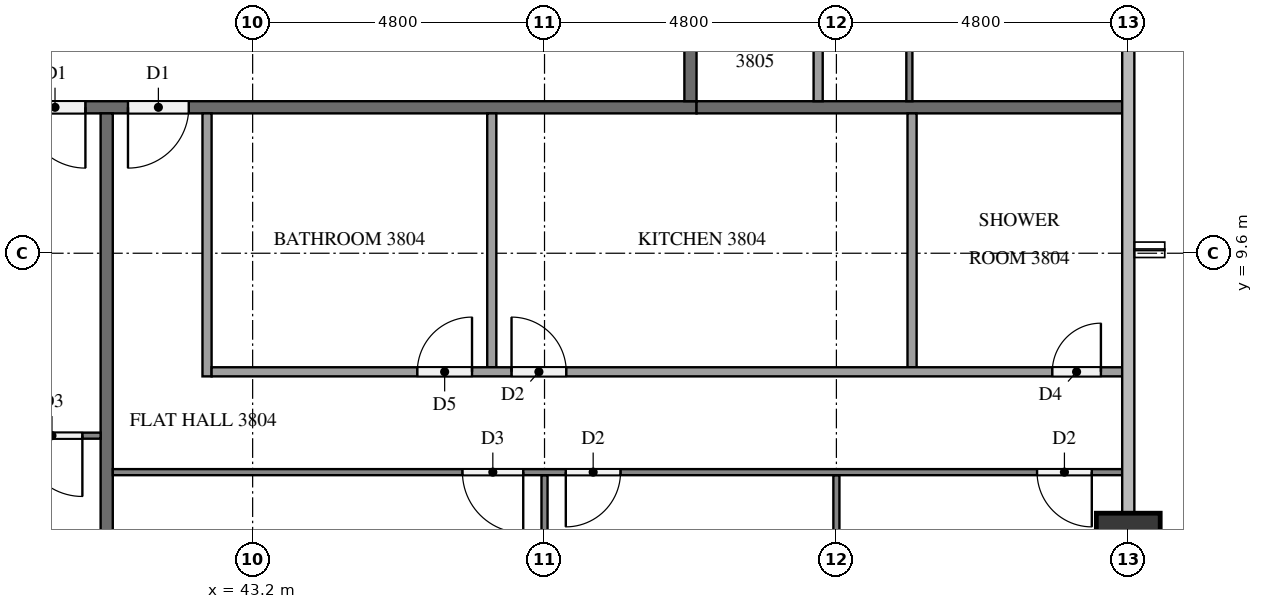
"""IFC4 building model, lengths in metres.
Left out: names, types, materials, properties, quantities, classifications, styles, units other than length and angle.
Written with IfcOpenShell. Run it as: python <this file> out.ifc"""

import sys

from ifc_helpers import new_model, si_unit, direction, frame, frame_2d, origin, origin_2d, place, context, subcontext, project, spatial, rectangle, extrude, element, fill, save


model = new_model("IFC4")
c1 = context("Model", 3, precision=1e-05, world=origin(), true_north=direction((0.0, 1.0)))
c2 = subcontext(c1, "Body", "Model", "MODEL_VIEW")
j1 = project(units=[si_unit("LENGTHUNIT", "METRE"), si_unit("PLANEANGLEUNIT", "RADIAN")], contexts=[c1])
p1 = place(None, origin())
s1 = spatial("IfcSite", under=j1, at=p1, CompositionType="ELEMENT")
p2 = place(p1, origin())
s2 = spatial("IfcBuilding", under=s1, at=p2, CompositionType="ELEMENT")
p3 = place(p2, frame((0.0, 0.0, 149.0)))
s3 = spatial("IfcBuildingStorey", under=s2, at=p3, CompositionType="ELEMENT", Elevation=149.0)
p4 = place(p3, frame((57.6, 4.8, 0.0), z_axis=(0.0, 0.0, 1.0), x_axis=(1.0, 0.0, 0.0)))
e1 = element("IfcColumn", 1, at=p4, inside=s3, PredefinedType="COLUMN", context=c2, shape_type="SweptSolid", body=[
    extrude(rectangle(XDim=1.05, YDim=1.05, at=origin_2d()), origin(), (0.0, 0.0, 1.0), 3.2),
])
p5 = place(p3, frame((50.5, 12.0, 0.0), z_axis=(0.0, 0.0, 1.0), x_axis=(-1.0, 0.0, 0.0)))
e2 = element("IfcWall", 2, at=p5, inside=s3, PredefinedType="PARTITIONING", context=c2, shape_type="SweptSolid", body=[
    extrude(rectangle(XDim=38.6, YDim=0.2, at=frame_2d((19.3, 0.0))), origin(), (0.0, 0.0, 1.0), 3.2),
])
p6 = place(p5, frame((36.45, 0.0, 0.0)))
e3 = element("IfcOpeningElement", 3, at=p6, cuts=e2, PredefinedType="OPENING", context=c2, shape_type="SweptSolid", body=[
    extrude(rectangle(XDim=1.0, YDim=2.1, at=frame_2d((0.5, 1.05))), frame((0.0, 0.11, 0.0), z_axis=(0.0, -1.0, 0.0), x_axis=(1.0, 0.0, 0.0)), (0.0, 0.0, 1.0), 0.22),
])
p7 = place(p5, frame((34.75, 0.0, 0.0)))
e4 = element("IfcOpeningElement", 4, at=p7, cuts=e2, PredefinedType="OPENING", context=c2, shape_type="SweptSolid", body=[
    extrude(rectangle(XDim=1.0, YDim=2.1, at=frame_2d((0.5, 1.05))), frame((0.0, 0.11, 0.0), z_axis=(0.0, -1.0, 0.0), x_axis=(1.0, 0.0, 0.0)), (0.0, 0.0, 1.0), 0.22),
])
p8 = place(p5, frame((10.05, 0.0, 0.0)))
e5 = element("IfcOpeningElement", 5, at=p8, cuts=e2, PredefinedType="OPENING", context=c2, shape_type="SweptSolid", body=[
    extrude(rectangle(XDim=1.0, YDim=2.1, at=frame_2d((0.5, 1.05))), frame((0.0, 0.11, 0.0), z_axis=(0.0, -1.0, 0.0), x_axis=(1.0, 0.0, 0.0)), (0.0, 0.0, 1.0), 0.22),
])
p9 = place(p5, frame((8.35, 0.0, 0.0)))
e6 = element("IfcOpeningElement", 6, at=p9, cuts=e2, PredefinedType="OPENING", context=c2, shape_type="SweptSolid", body=[
    extrude(rectangle(XDim=1.0, YDim=2.1, at=frame_2d((0.5, 1.05))), frame((0.0, 0.11, 0.0), z_axis=(0.0, -1.0, 0.0), x_axis=(1.0, 0.0, 0.0)), (0.0, 0.0, 1.0), 0.22),
])
p10 = place(p3, frame((50.4, 40.7, 0.0), z_axis=(0.0, 0.0, 1.0), x_axis=(0.0, -1.0, 0.0)))
e7 = element("IfcWall", 7, at=p10, inside=s3, PredefinedType="PARTITIONING", context=c2, shape_type="SweptSolid", body=[
    extrude(rectangle(XDim=28.6, YDim=0.2, at=frame_2d((14.3, 0.0))), origin(), (0.0, 0.0, 1.0), 3.2),
])
p11 = place(p10, frame((17.05, 0.0, 0.0)))
e8 = element("IfcOpeningElement", 8, at=p11, cuts=e7, PredefinedType="OPENING", context=c2, shape_type="SweptSolid", body=[
    extrude(rectangle(XDim=1.0, YDim=2.1, at=frame_2d((0.5, 1.05))), frame((0.0, 0.11, 0.0), z_axis=(0.0, -1.0, 0.0), x_axis=(1.0, 0.0, 0.0)), (0.0, 0.0, 1.0), 0.22),
])
p12 = place(p10, frame((15.35, 0.0, 0.0)))
e9 = element("IfcOpeningElement", 9, at=p12, cuts=e7, PredefinedType="OPENING", context=c2, shape_type="SweptSolid", body=[
    extrude(rectangle(XDim=1.0, YDim=2.1, at=frame_2d((0.5, 1.05))), frame((0.0, 0.11, 0.0), z_axis=(0.0, -1.0, 0.0), x_axis=(1.0, 0.0, 0.0)), (0.0, 0.0, 1.0), 0.22),
])
p13 = place(p10, frame((5.75, 0.0, 0.0)))
e10 = element("IfcOpeningElement", 10, at=p13, cuts=e7, PredefinedType="OPENING", context=c2, shape_type="SweptSolid", body=[
    extrude(rectangle(XDim=1.0, YDim=2.1, at=frame_2d((0.5, 1.05))), frame((0.0, 0.11, 0.0), z_axis=(0.0, -1.0, 0.0), x_axis=(1.0, 0.0, 0.0)), (0.0, 0.0, 1.0), 0.22),
])
p14 = place(p3, frame((40.8, 11.9, 0.0), z_axis=(0.0, 0.0, 1.0), x_axis=(0.0, -1.0, 0.0)))
e11 = element("IfcWall", 11, at=p14, inside=s3, PredefinedType="PARTITIONING", context=c2, shape_type="SweptSolid", body=[
    extrude(rectangle(XDim=11.8, YDim=0.2, at=frame_2d((5.9, 0.0))), origin(), (0.0, 0.0, 1.0), 3.2),
])
p15 = place(p3, frame((50.5, 12.0, 0.0), z_axis=(0.0, 0.0, 1.0), x_axis=(1.0, 0.0, 0.0)))
e12 = element("IfcWall", 12, at=p15, inside=s3, PredefinedType="PARTITIONING", context=c2, shape_type="SweptSolid", body=[
    extrude(rectangle(XDim=7.0, YDim=0.2, at=frame_2d((3.5, 0.0))), origin(), (0.0, 0.0, 1.0), 3.2),
])
p16 = place(p3, frame((40.7, 6.6, 0.0), z_axis=(0.0, 0.0, 1.0), x_axis=(-1.0, 0.0, 0.0)))
e13 = element("IfcWall", 13, at=p16, inside=s3, PredefinedType="PARTITIONING", context=c2, shape_type="SweptSolid", body=[
    extrude(rectangle(XDim=14.2, YDim=0.1, at=frame_2d((7.1, 0.0))), origin(), (0.0, 0.0, 1.0), 3.2),
])
p17 = place(p16, frame((0.3, 0.0, 0.0)))
e14 = element("IfcOpeningElement", 14, at=p17, cuts=e13, PredefinedType="OPENING", context=c2, shape_type="SweptSolid", body=[
    extrude(rectangle(XDim=1.0, YDim=2.1, at=frame_2d((0.5, 1.05))), frame((0.0, 0.06, 0.0), z_axis=(0.0, -1.0, 0.0), x_axis=(1.0, 0.0, 0.0)), (0.0, 0.0, 1.0), 0.12),
])
p18 = place(p16, frame((8.25, 0.0, 0.0)))
e15 = element("IfcOpeningElement", 15, at=p18, cuts=e13, PredefinedType="OPENING", context=c2, shape_type="SweptSolid", body=[
    extrude(rectangle(XDim=0.9, YDim=2.1, at=frame_2d((0.45, 1.05))), frame((0.0, 0.06, 0.0), z_axis=(0.0, -1.0, 0.0), x_axis=(1.0, 0.0, 0.0)), (0.0, 0.0, 1.0), 0.12),
])
p19 = place(p16, frame((9.85, 0.0, 0.0)))
e16 = element("IfcOpeningElement", 16, at=p19, cuts=e13, PredefinedType="OPENING", context=c2, shape_type="SweptSolid", body=[
    extrude(rectangle(XDim=0.9, YDim=2.1, at=frame_2d((0.45, 1.05))), frame((0.0, 0.06, 0.0), z_axis=(0.0, -1.0, 0.0), x_axis=(1.0, 0.0, 0.0)), (0.0, 0.0, 1.0), 0.12),
])
p20 = place(p3, frame((48.0, 5.95, 0.0), z_axis=(0.0, 0.0, 1.0), x_axis=(0.0, -1.0, 0.0)))
e17 = element("IfcWall", 17, at=p20, inside=s3, PredefinedType="PARTITIONING", context=c2, shape_type="SweptSolid", body=[
    extrude(rectangle(XDim=5.85, YDim=0.1, at=frame_2d((2.925, 0.0))), origin(), (0.0, 0.0, 1.0), 3.2),
])
p21 = place(p3, frame((52.8, 5.95, 0.0), z_axis=(0.0, 0.0, 1.0), x_axis=(0.0, -1.0, 0.0)))
e18 = element("IfcWall", 18, at=p21, inside=s3, PredefinedType="PARTITIONING", context=c2, shape_type="SweptSolid", body=[
    extrude(rectangle(XDim=5.425, YDim=0.1, at=frame_2d((2.712, 0.0))), origin(), (0.0, 0.0, 1.0), 3.2),
])
p22 = place(p3, frame((57.5, 6.0, 0.0), z_axis=(0.0, 0.0, 1.0), x_axis=(-1.0, 0.0, 0.0)))
e19 = element("IfcWall", 19, at=p22, inside=s3, PredefinedType="PARTITIONING", context=c2, shape_type="SweptSolid", body=[
    extrude(rectangle(XDim=16.6, YDim=0.1, at=frame_2d((8.3, 0.0))), origin(), (0.0, 0.0, 1.0), 3.2),
])
p23 = place(p22, frame((9.85, 0.0, 0.0)))
e20 = element("IfcOpeningElement", 20, at=p23, cuts=e19, PredefinedType="OPENING", context=c2, shape_type="SweptSolid", body=[
    extrude(rectangle(XDim=1.0, YDim=2.1, at=frame_2d((0.5, 1.05))), frame((0.0, 0.06, 0.0), z_axis=(0.0, -1.0, 0.0), x_axis=(1.0, 0.0, 0.0)), (0.0, 0.0, 1.0), 0.12),
])
p24 = place(p22, frame((8.25, 0.0, 0.0)))
e21 = element("IfcOpeningElement", 21, at=p24, cuts=e19, PredefinedType="OPENING", context=c2, shape_type="SweptSolid", body=[
    extrude(rectangle(XDim=0.9, YDim=2.1, at=frame_2d((0.45, 1.05))), frame((0.0, 0.06, 0.0), z_axis=(0.0, -1.0, 0.0), x_axis=(1.0, 0.0, 0.0)), (0.0, 0.0, 1.0), 0.12),
])
p25 = place(p22, frame((0.5, 0.0, 0.0)))
e22 = element("IfcOpeningElement", 22, at=p25, cuts=e19, PredefinedType="OPENING", context=c2, shape_type="SweptSolid", body=[
    extrude(rectangle(XDim=0.9, YDim=2.1, at=frame_2d((0.45, 1.05))), frame((0.0, 0.06, 0.0), z_axis=(0.0, -1.0, 0.0), x_axis=(1.0, 0.0, 0.0)), (0.0, 0.0, 1.0), 0.12),
])
for number, where, z_axis, x_axis in (
    (23, (47.133, 11.9, 0.0), (0.0, 0.0, 1.0), (0.0, -1.0, 0.0)),
    (24, (54.044, 11.9, 0.0), (0.0, 0.0, 1.0), (0.0, -1.0, 0.0)),
):
    element("IfcWall", number, at=place(p3, frame(where, z_axis=z_axis, x_axis=x_axis)), inside=s3, PredefinedType="PARTITIONING", context=c2, shape_type="SweptSolid", body=[
        extrude(rectangle(XDim=4.175, YDim=0.15, at=frame_2d((2.087, 0.0))), origin(), (0.0, 0.0, 1.0), 3.2),
    ])
p26 = place(p3, frame((42.45, 11.9, 0.0), z_axis=(0.0, 0.0, 1.0), x_axis=(0.0, -1.0, 0.0)))
e25 = element("IfcWall", 25, at=p26, inside=s3, PredefinedType="PARTITIONING", context=c2, shape_type="SweptSolid", body=[
    extrude(rectangle(XDim=4.325, YDim=0.15, at=frame_2d((2.163, 0.0))), origin(), (0.0, 0.0, 1.0), 3.2),
])
p27 = place(p3, frame((42.525, 7.65, 0.0), z_axis=(0.0, 0.0, 1.0), x_axis=(1.0, 0.0, 0.0)))
e26 = element("IfcWall", 26, at=p27, inside=s3, PredefinedType="PARTITIONING", context=c2, shape_type="SweptSolid", body=[
    extrude(rectangle(XDim=14.975, YDim=0.15, at=frame_2d((7.488, 0.0))), origin(), (0.0, 0.0, 1.0), 3.2),
])
p28 = place(p27, frame((3.383, 0.0, 0.0)))
e27 = element("IfcOpeningElement", 27, at=p28, cuts=e26, PredefinedType="OPENING", context=c2, shape_type="SweptSolid", body=[
    extrude(rectangle(XDim=0.9, YDim=2.1, at=frame_2d((0.45, 1.05))), frame((0.0, 0.085, 0.0), z_axis=(0.0, -1.0, 0.0), x_axis=(1.0, 0.0, 0.0)), (0.0, 0.0, 1.0), 0.17),
])
p29 = place(p27, frame((4.933, 0.0, 0.0)))
e28 = element("IfcOpeningElement", 28, at=p29, cuts=e26, PredefinedType="OPENING", context=c2, shape_type="SweptSolid", body=[
    extrude(rectangle(XDim=0.9, YDim=2.1, at=frame_2d((0.45, 1.05))), frame((0.0, 0.085, 0.0), z_axis=(0.0, -1.0, 0.0), x_axis=(1.0, 0.0, 0.0)), (0.0, 0.0, 1.0), 0.17),
])
p30 = place(p27, frame((13.825, 0.0, 0.0)))
e29 = element("IfcOpeningElement", 29, at=p30, cuts=e26, PredefinedType="OPENING", context=c2, shape_type="SweptSolid", body=[
    extrude(rectangle(XDim=0.8, YDim=2.1, at=frame_2d((0.4, 1.05))), frame((0.0, 0.085, 0.0), z_axis=(0.0, -1.0, 0.0), x_axis=(1.0, 0.0, 0.0)), (0.0, 0.0, 1.0), 0.17),
])
p31 = place(p3, frame((54.0, 23.9, 0.0), z_axis=(0.0, 0.0, 1.0), x_axis=(0.0, -1.0, 0.0)))
e30 = element("IfcWall", 30, at=p31, inside=s3, PredefinedType="PARTITIONING", context=c2, shape_type="SweptSolid", body=[
    extrude(rectangle(XDim=11.8, YDim=0.1, at=frame_2d((5.9, 0.0))), origin(), (0.0, 0.0, 1.0), 3.2),
])
p32 = place(p31, frame((3.45, 0.0, 0.0)))
e31 = element("IfcOpeningElement", 31, at=p32, cuts=e30, PredefinedType="OPENING", context=c2, shape_type="SweptSolid", body=[
    extrude(rectangle(XDim=0.9, YDim=2.1, at=frame_2d((0.45, 1.05))), frame((0.0, 0.06, 0.0), z_axis=(0.0, -1.0, 0.0), x_axis=(1.0, 0.0, 0.0)), (0.0, 0.0, 1.0), 0.12),
])
p33 = place(p31, frame((5.05, 0.0, 0.0)))
e32 = element("IfcOpeningElement", 32, at=p33, cuts=e30, PredefinedType="OPENING", context=c2, shape_type="SweptSolid", body=[
    extrude(rectangle(XDim=1.0, YDim=2.1, at=frame_2d((0.5, 1.05))), frame((0.0, 0.06, 0.0), z_axis=(0.0, -1.0, 0.0), x_axis=(1.0, 0.0, 0.0)), (0.0, 0.0, 1.0), 0.12),
])
p34 = place(p3, frame((52.5, 12.1, 0.0), z_axis=(0.0, 0.0, 1.0), x_axis=(0.0, 1.0, 0.0)))
e33 = element("IfcWall", 33, at=p34, inside=s3, PredefinedType="PARTITIONING", context=c2, shape_type="SweptSolid", body=[
    extrude(rectangle(XDim=10.175, YDim=0.15, at=frame_2d((5.087, 0.0))), origin(), (0.0, 0.0, 1.0), 3.2),
])
p35 = place(p34, frame((6.43, 0.0, 0.0)))
e34 = element("IfcOpeningElement", 34, at=p35, cuts=e33, PredefinedType="OPENING", context=c2, shape_type="SweptSolid", body=[
    extrude(rectangle(XDim=0.8, YDim=2.1, at=frame_2d((0.4, 1.05))), frame((0.0, 0.085, 0.0), z_axis=(0.0, -1.0, 0.0), x_axis=(1.0, 0.0, 0.0)), (0.0, 0.0, 1.0), 0.17),
])
p36 = place(p34, frame((4.88, 0.0, 0.0)))
e35 = element("IfcOpeningElement", 35, at=p36, cuts=e33, PredefinedType="OPENING", context=c2, shape_type="SweptSolid", body=[
    extrude(rectangle(XDim=0.9, YDim=2.1, at=frame_2d((0.45, 1.05))), frame((0.0, 0.085, 0.0), z_axis=(0.0, -1.0, 0.0), x_axis=(1.0, 0.0, 0.0)), (0.0, 0.0, 1.0), 0.17),
])
p37 = place(p8, origin())
e36 = element("IfcDoor", 36, at=p37, inside=s3, OperationType="SINGLE_SWING_LEFT", PredefinedType="DOOR", context=c2, shape_type="SweptSolid", body=[
    extrude(rectangle(XDim=1.0, YDim=2.1, at=frame_2d((0.5, 1.05))), frame((0.0, 0.025, 0.0), z_axis=(0.0, -1.0, 0.0), x_axis=(1.0, 0.0, 0.0)), (0.0, 0.0, 1.0), 0.05),
])
fill(e5, e36)
p38 = place(p9, origin())
e37 = element("IfcDoor", 37, at=p38, inside=s3, OperationType="SINGLE_SWING_RIGHT", PredefinedType="DOOR", context=c2, shape_type="SweptSolid", body=[
    extrude(rectangle(XDim=1.0, YDim=2.1, at=frame_2d((0.5, 1.05))), frame((0.0, 0.025, 0.0), z_axis=(0.0, -1.0, 0.0), x_axis=(1.0, 0.0, 0.0)), (0.0, 0.0, 1.0), 0.05),
])
fill(e6, e37)
p39 = place(p17, origin())
e38 = element("IfcDoor", 38, at=p39, inside=s3, OperationType="SINGLE_SWING_LEFT", PredefinedType="DOOR", context=c2, shape_type="SweptSolid", body=[
    extrude(rectangle(XDim=1.0, YDim=2.1, at=frame_2d((0.5, 1.05))), frame((0.0, 0.025, 0.0), z_axis=(0.0, -1.0, 0.0), x_axis=(1.0, 0.0, 0.0)), (0.0, 0.0, 1.0), 0.05),
])
fill(e14, e38)
p40 = place(p23, origin())
e39 = element("IfcDoor", 39, at=p40, inside=s3, OperationType="SINGLE_SWING_LEFT", PredefinedType="DOOR", context=c2, shape_type="SweptSolid", body=[
    extrude(rectangle(XDim=1.0, YDim=2.1, at=frame_2d((0.5, 1.05))), frame((0.0, 0.025, 0.0), z_axis=(0.0, -1.0, 0.0), x_axis=(1.0, 0.0, 0.0)), (0.0, 0.0, 1.0), 0.05),
])
fill(e20, e39)
p41 = place(p24, origin())
e40 = element("IfcDoor", 40, at=p41, inside=s3, OperationType="SINGLE_SWING_RIGHT", PredefinedType="DOOR", context=c2, shape_type="SweptSolid", body=[
    extrude(rectangle(XDim=0.9, YDim=2.1, at=frame_2d((0.45, 1.05))), frame((0.0, 0.025, 0.0), z_axis=(0.0, -1.0, 0.0), x_axis=(1.0, 0.0, 0.0)), (0.0, 0.0, 1.0), 0.05),
])
fill(e21, e40)
p42 = place(p25, origin())
e41 = element("IfcDoor", 41, at=p42, inside=s3, OperationType="SINGLE_SWING_LEFT", PredefinedType="DOOR", context=c2, shape_type="SweptSolid", body=[
    extrude(rectangle(XDim=0.9, YDim=2.1, at=frame_2d((0.45, 1.05))), frame((0.0, 0.025, 0.0), z_axis=(0.0, -1.0, 0.0), x_axis=(1.0, 0.0, 0.0)), (0.0, 0.0, 1.0), 0.05),
])
fill(e22, e41)
p43 = place(p28, origin())
e42 = element("IfcDoor", 42, at=p43, inside=s3, OperationType="SINGLE_SWING_RIGHT", PredefinedType="DOOR", context=c2, shape_type="SweptSolid", body=[
    extrude(rectangle(XDim=0.9, YDim=2.1, at=frame_2d((0.45, 1.05))), frame((0.0, 0.025, 0.0), z_axis=(0.0, -1.0, 0.0), x_axis=(1.0, 0.0, 0.0)), (0.0, 0.0, 1.0), 0.05),
])
fill(e27, e42)
p44 = place(p29, origin())
e43 = element("IfcDoor", 43, at=p44, inside=s3, OperationType="SINGLE_SWING_LEFT", PredefinedType="DOOR", context=c2, shape_type="SweptSolid", body=[
    extrude(rectangle(XDim=0.9, YDim=2.1, at=frame_2d((0.45, 1.05))), frame((0.0, 0.025, 0.0), z_axis=(0.0, -1.0, 0.0), x_axis=(1.0, 0.0, 0.0)), (0.0, 0.0, 1.0), 0.05),
])
fill(e28, e43)
p45 = place(p30, origin())
e44 = element("IfcDoor", 44, at=p45, inside=s3, OperationType="SINGLE_SWING_RIGHT", PredefinedType="DOOR", context=c2, shape_type="SweptSolid", body=[
    extrude(rectangle(XDim=0.8, YDim=2.1, at=frame_2d((0.4, 1.05))), frame((0.0, 0.025, 0.0), z_axis=(0.0, -1.0, 0.0), x_axis=(1.0, 0.0, 0.0)), (0.0, 0.0, 1.0), 0.05),
])
fill(e29, e44)
save(model, sys.argv[1])
